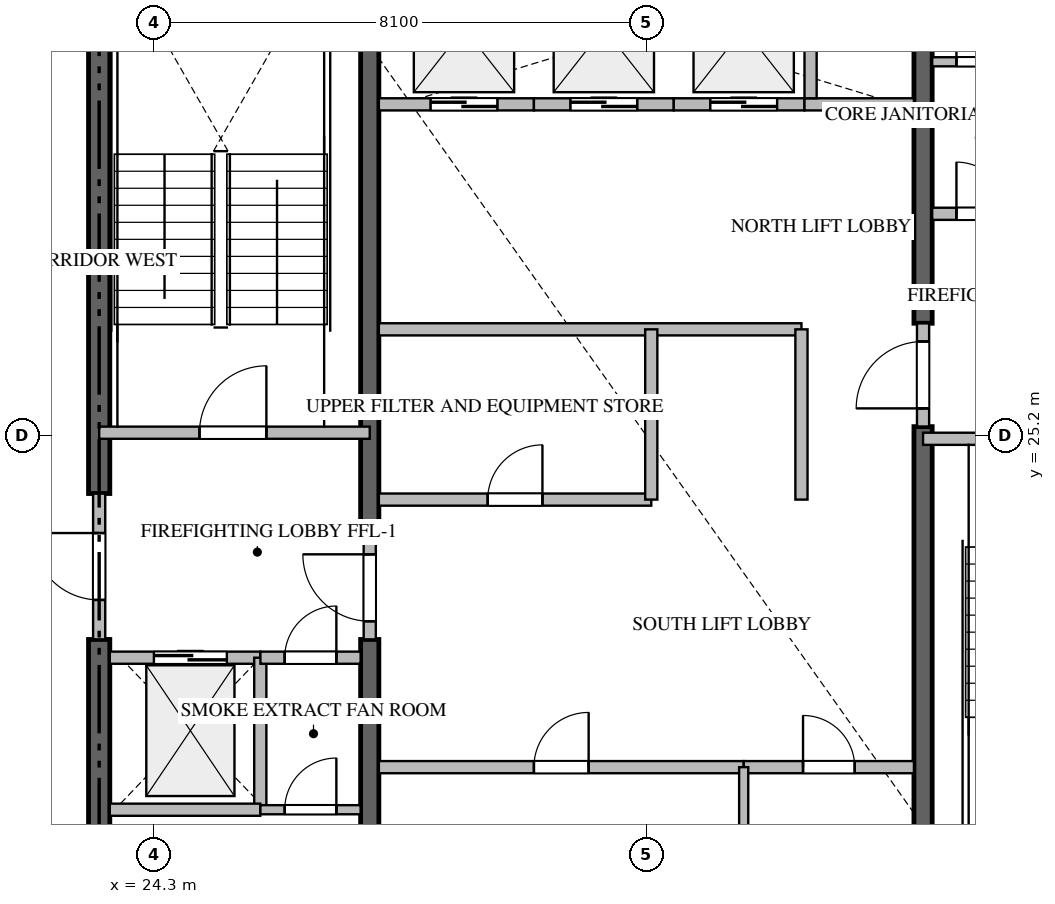
"""IFC4 building model, lengths in metres.
Left out: names, types, materials, properties, quantities, classifications, styles, units other than length and angle.
Written with IfcOpenShell. Run it as: python <this file> out.ifc"""

import sys

from ifc_helpers import new_model, si_unit, direction, frame, frame_2d, origin, place, context, subcontext, project, spatial, rectangle, extrude, source, transform, mapped, element, fill, save


model = new_model("IFC4")
c1 = context("Model", 3, precision=1e-05, world=origin(), true_north=direction((0.0, 1.0)))
c2 = subcontext(c1, "Body", "Model", "MODEL_VIEW")
j1 = project(units=[si_unit("LENGTHUNIT", "METRE"), si_unit("PLANEANGLEUNIT", "RADIAN")], contexts=[c1])
p1 = place(None, origin())
s1 = spatial("IfcSite", under=j1, at=p1, CompositionType="ELEMENT")
p2 = place(p1, origin())
s2 = spatial("IfcBuilding", under=s1, at=p2, CompositionType="ELEMENT")
p3 = place(p2, frame((0.0, 0.0, 272.05)))
s3 = spatial("IfcBuildingStorey", under=s2, at=p3, CompositionType="ELEMENT", Elevation=272.05)
p4 = place(p3, frame((23.4, 16.975, -0.26), z_axis=(0.0, 0.0, 1.0), x_axis=(0.0, 1.0, 0.0)))
e1 = element("IfcWall", 1, at=p4, inside=s3, PredefinedType="SHEAR", context=c2, shape_type="SweptSolid", body=[
    extrude(rectangle(XDim=4.875, YDim=0.35, at=frame_2d((2.438, 0.0))), origin(), (0.0, 0.0, 1.0), 3.848),
])
p5 = place(p3, frame((23.4, 24.25, -0.26), z_axis=(0.0, 0.0, 1.0), x_axis=(0.0, 1.0, 0.0)))
e2 = element("IfcWall", 2, at=p5, inside=s3, PredefinedType="SHEAR", context=c2, shape_type="SweptSolid", body=[
    extrude(rectangle(XDim=9.175, YDim=0.35, at=frame_2d((4.587, 0.0))), origin(), (0.0, 0.0, 1.0), 3.848),
])
p6 = place(p3, frame((27.85, 16.975, -0.26), z_axis=(0.0, 0.0, 1.0), x_axis=(0.0, 1.0, 0.0)))
e3 = element("IfcWall", 3, at=p6, inside=s3, PredefinedType="SHEAR", context=c2, shape_type="SweptSolid", body=[
    extrude(rectangle(XDim=4.875, YDim=0.3, at=frame_2d((2.438, 0.0))), origin(), (0.0, 0.0, 1.0), 3.848),
])
p7 = place(p3, frame((27.85, 23.55, -0.26), z_axis=(0.0, 0.0, 1.0), x_axis=(0.0, 1.0, 0.0)))
e4 = element("IfcWall", 4, at=p7, inside=s3, PredefinedType="SHEAR", context=c2, shape_type="SweptSolid", body=[
    extrude(rectangle(XDim=9.875, YDim=0.3, at=frame_2d((4.938, 0.0))), origin(), (0.0, 0.0, 1.0), 3.848),
])
p8 = place(p3, frame((36.95, 16.975, -0.26), z_axis=(0.0, 0.0, 1.0), x_axis=(0.0, 1.0, 0.0)))
e5 = element("IfcWall", 5, at=p8, inside=s3, PredefinedType="SHEAR", context=c2, shape_type="SweptSolid", body=[
    extrude(rectangle(XDim=8.375, YDim=0.3, at=frame_2d((4.188, 0.0))), origin(), (0.0, 0.0, 1.0), 3.848),
])
p9 = place(p3, frame((36.95, 27.05, -0.26), z_axis=(0.0, 0.0, 1.0), x_axis=(0.0, 1.0, 0.0)))
e6 = element("IfcWall", 6, at=p9, inside=s3, PredefinedType="SHEAR", context=c2, shape_type="SweptSolid", body=[
    extrude(rectangle(XDim=6.375, YDim=0.3, at=frame_2d((3.188, 0.0))), origin(), (0.0, 0.0, 1.0), 3.848),
])
p10 = place(p3, frame((23.4, 25.25, 0.0), z_axis=(0.0, 0.0, 1.0), x_axis=(1.0, 0.0, 0.0)))
e7 = element("IfcWall", 7, at=p10, inside=s3, PredefinedType="STANDARD", context=c2, shape_type="SweptSolid", body=[
    extrude(rectangle(XDim=4.45, YDim=0.2, at=frame_2d((2.225, 0.0))), origin(), (0.0, 0.0, 1.0), 3.59),
])
p11 = place(p10, frame((1.65, 0.0, 0.0)))
e8 = element("IfcOpeningElement", 8, at=p11, cuts=e7, PredefinedType="OPENING", context=c2, shape_type="SweptSolid", body=[
    extrude(rectangle(XDim=1.1, YDim=2.15, at=frame_2d((0.55, 1.075))), frame((0.0, 0.11, 0.0), z_axis=(0.0, -1.0, 0.0), x_axis=(1.0, 0.0, 0.0)), (0.0, 0.0, 1.0), 0.22),
])
p12 = place(p3, frame((36.95, 25.15, 0.0), z_axis=(0.0, 0.0, 1.0), x_axis=(1.0, 0.0, 0.0)))
e9 = element("IfcWall", 9, at=p12, inside=s3, PredefinedType="STANDARD", context=c2, shape_type="SweptSolid", body=[
    extrude(rectangle(XDim=4.45, YDim=0.2, at=frame_2d((2.225, 0.0))), origin(), (0.0, 0.0, 1.0), 3.59),
])
p13 = place(p12, frame((1.65, 0.0, 0.0)))
e10 = element("IfcOpeningElement", 10, at=p13, cuts=e9, PredefinedType="OPENING", context=c2, shape_type="SweptSolid", body=[
    extrude(rectangle(XDim=1.1, YDim=2.15, at=frame_2d((0.55, 1.075))), frame((0.0, 0.11, 0.0), z_axis=(0.0, -1.0, 0.0), x_axis=(1.0, 0.0, 0.0)), (0.0, 0.0, 1.0), 0.22),
])
p14 = place(p3, frame((23.575, 21.55, 0.0), z_axis=(0.0, 0.0, 1.0), x_axis=(1.0, 0.0, 0.0)))
e11 = element("IfcWall", 11, at=p14, inside=s3, PredefinedType="STANDARD", context=c2, shape_type="SweptSolid", body=[
    extrude(rectangle(XDim=2.475, YDim=0.2, at=frame_2d((1.238, 0.0))), origin(), (0.0, 0.0, 1.0), 3.59),
])
p15 = place(p14, frame((0.725, 0.0, 0.0)))
e12 = element("IfcOpeningElement", 12, at=p15, cuts=e11, PredefinedType="OPENING", context=c2, shape_type="SweptSolid", body=[
    extrude(rectangle(XDim=1.2, YDim=2.2, at=frame_2d((0.6, 1.1))), frame((0.0, 0.11, 0.0), z_axis=(0.0, -1.0, 0.0), x_axis=(1.0, 0.0, 0.0)), (0.0, 0.0, 1.0), 0.22),
])
p16 = place(p3, frame((28.0, 30.65, 0.0), z_axis=(0.0, 0.0, 1.0), x_axis=(1.0, 0.0, 0.0)))
e13 = element("IfcWall", 13, at=p16, inside=s3, PredefinedType="STANDARD", context=c2, shape_type="SweptSolid", body=[
    extrude(rectangle(XDim=2.55, YDim=0.2, at=frame_2d((1.275, 0.0))), origin(), (0.0, 0.0, 1.0), 3.59),
])
p17 = place(p16, frame((0.85, 0.0, 0.0)))
e14 = element("IfcOpeningElement", 14, at=p17, cuts=e13, PredefinedType="OPENING", context=c2, shape_type="SweptSolid", body=[
    extrude(rectangle(XDim=1.1, YDim=2.2, at=frame_2d((0.55, 1.1))), frame((0.0, 0.11, 0.0), z_axis=(0.0, -1.0, 0.0), x_axis=(1.0, 0.0, 0.0)), (0.0, 0.0, 1.0), 0.22),
])
p18 = place(p3, frame((30.55, 30.65, 0.0), z_axis=(0.0, 0.0, 1.0), x_axis=(1.0, 0.0, 0.0)))
e15 = element("IfcWall", 15, at=p18, inside=s3, PredefinedType="STANDARD", context=c2, shape_type="SweptSolid", body=[
    extrude(rectangle(XDim=2.3, YDim=0.2, at=frame_2d((1.15, 0.0))), origin(), (0.0, 0.0, 1.0), 3.59),
])
p19 = place(p18, frame((0.6, 0.0, 0.0)))
e16 = element("IfcOpeningElement", 16, at=p19, cuts=e15, PredefinedType="OPENING", context=c2, shape_type="SweptSolid", body=[
    extrude(rectangle(XDim=1.1, YDim=2.2, at=frame_2d((0.55, 1.1))), frame((0.0, 0.11, 0.0), z_axis=(0.0, -1.0, 0.0), x_axis=(1.0, 0.0, 0.0)), (0.0, 0.0, 1.0), 0.22),
])
p20 = place(p3, frame((32.85, 30.65, 0.0), z_axis=(0.0, 0.0, 1.0), x_axis=(1.0, 0.0, 0.0)))
e17 = element("IfcWall", 17, at=p20, inside=s3, PredefinedType="STANDARD", context=c2, shape_type="SweptSolid", body=[
    extrude(rectangle(XDim=2.15, YDim=0.2, at=frame_2d((1.075, 0.0))), origin(), (0.0, 0.0, 1.0), 3.59),
])
p21 = place(p20, frame((0.6, 0.0, 0.0)))
e18 = element("IfcOpeningElement", 18, at=p21, cuts=e17, PredefinedType="OPENING", context=c2, shape_type="SweptSolid", body=[
    extrude(rectangle(XDim=1.1, YDim=2.2, at=frame_2d((0.55, 1.1))), frame((0.0, 0.11, 0.0), z_axis=(0.0, -1.0, 0.0), x_axis=(1.0, 0.0, 0.0)), (0.0, 0.0, 1.0), 0.22),
])
p22 = place(p3, frame((35.0, 30.65, 0.0), z_axis=(0.0, 0.0, 1.0), x_axis=(1.0, 0.0, 0.0)))
e19 = element("IfcWall", 19, at=p22, inside=s3, PredefinedType="STANDARD", context=c2, shape_type="SweptSolid", body=[
    extrude(rectangle(XDim=1.8, YDim=0.2, at=frame_2d((0.9, 0.0))), origin(), (0.0, 0.0, 1.0), 3.59),
])
p23 = place(p3, frame((35.1, 30.75, 0.0), z_axis=(0.0, 0.0, 1.0), x_axis=(0.0, 1.0, 0.0)))
e20 = element("IfcWall", 20, at=p23, inside=s3, PredefinedType="STANDARD", context=c2, shape_type="SweptSolid", body=[
    extrude(rectangle(XDim=2.675, YDim=0.2, at=frame_2d((1.337, 0.0))), origin(), (0.0, 0.0, 1.0), 3.59),
])
p24 = place(p3, frame((26.05, 19.05, 0.0), z_axis=(0.0, 0.0, 1.0), x_axis=(0.0, 1.0, 0.0)))
e21 = element("IfcWall", 21, at=p24, inside=s3, PredefinedType="STANDARD", context=c2, shape_type="SweptSolid", body=[
    extrude(rectangle(XDim=2.5, YDim=0.2, at=frame_2d((1.25, 0.0))), origin(), (0.0, 0.0, 1.0), 3.59),
])
p25 = place(p3, frame((23.575, 19.05, 0.0), z_axis=(0.0, 0.0, 1.0), x_axis=(1.0, 0.0, 0.0)))
e22 = element("IfcWall", 22, at=p25, inside=s3, PredefinedType="STANDARD", context=c2, shape_type="SweptSolid", body=[
    extrude(rectangle(XDim=2.475, YDim=0.2, at=frame_2d((1.238, 0.0))), origin(), (0.0, 0.0, 1.0), 3.59),
])
p26 = place(p3, frame((26.052, 21.55, 0.0), z_axis=(0.0, 0.0, 1.0), x_axis=(1.0, 0.0, 0.0)))
e23 = element("IfcWall", 23, at=p26, inside=s3, PredefinedType="STANDARD", context=c2, shape_type="SweptSolid", body=[
    extrude(rectangle(XDim=1.648, YDim=0.2, at=frame_2d((0.824, 0.0))), origin(), (0.0, 0.0, 1.0), 3.59),
])
p27 = place(p26, frame((0.399, 0.0, 0.0)))
e24 = element("IfcOpeningElement", 24, at=p27, cuts=e23, PredefinedType="OPENING", context=c2, shape_type="SweptSolid", body=[
    extrude(rectangle(XDim=0.85, YDim=2.1, at=frame_2d((0.425, 1.05))), frame((0.0, 0.11, 0.0), z_axis=(0.0, -1.0, 0.0), x_axis=(1.0, 0.0, 0.0)), (0.0, 0.0, 1.0), 0.22),
])
p28 = place(p3, frame((37.1, 28.85, 0.0), z_axis=(0.0, 0.0, 1.0), x_axis=(1.0, 0.0, 0.0)))
e25 = element("IfcWall", 25, at=p28, inside=s3, PredefinedType="STANDARD", context=c2, shape_type="SweptSolid", body=[
    extrude(rectangle(XDim=1.648, YDim=0.2, at=frame_2d((0.824, 0.0))), origin(), (0.0, 0.0, 1.0), 3.59),
])
p29 = place(p28, frame((0.399, 0.0, 0.0)))
e26 = element("IfcOpeningElement", 26, at=p29, cuts=e25, PredefinedType="OPENING", context=c2, shape_type="SweptSolid", body=[
    extrude(rectangle(XDim=0.85, YDim=2.1, at=frame_2d((0.425, 1.05))), frame((0.0, 0.11, 0.0), z_axis=(0.0, -1.0, 0.0), x_axis=(1.0, 0.0, 0.0)), (0.0, 0.0, 1.0), 0.22),
])
p30 = place(p3, frame((23.4, 21.852, 0.0), z_axis=(0.0, 0.0, 1.0), x_axis=(0.0, 1.0, 0.0)))
e27 = element("IfcWall", 27, at=p30, inside=s3, PredefinedType="STANDARD", context=c2, shape_type="SweptSolid", body=[
    extrude(rectangle(XDim=2.396, YDim=0.2, at=frame_2d((1.198, 0.0))), origin(), (0.0, 0.0, 1.0), 3.59),
])
p31 = place(p30, frame((0.648, 0.0, 0.0)))
e28 = element("IfcOpeningElement", 28, at=p31, cuts=e27, PredefinedType="OPENING", context=c2, shape_type="SweptSolid", body=[
    extrude(rectangle(XDim=1.1, YDim=2.15, at=frame_2d((0.55, 1.075))), frame((0.0, 0.11, 0.0), z_axis=(0.0, -1.0, 0.0), x_axis=(1.0, 0.0, 0.0)), (0.0, 0.0, 1.0), 0.22),
])
p32 = place(p3, frame((27.85, 21.852, 0.0), z_axis=(0.0, 0.0, 1.0), x_axis=(0.0, 1.0, 0.0)))
e29 = element("IfcWall", 29, at=p32, inside=s3, PredefinedType="STANDARD", context=c2, shape_type="SweptSolid", body=[
    extrude(rectangle(XDim=1.696, YDim=0.2, at=frame_2d((0.848, 0.0))), origin(), (0.0, 0.0, 1.0), 3.59),
])
p33 = place(p32, frame((0.298, 0.0, 0.0)))
e30 = element("IfcOpeningElement", 30, at=p33, cuts=e29, PredefinedType="OPENING", context=c2, shape_type="SweptSolid", body=[
    extrude(rectangle(XDim=1.1, YDim=2.15, at=frame_2d((0.55, 1.075))), frame((0.0, 0.11, 0.0), z_axis=(0.0, -1.0, 0.0), x_axis=(1.0, 0.0, 0.0)), (0.0, 0.0, 1.0), 0.22),
])
p34 = place(p3, frame((36.95, 25.352, 0.0), z_axis=(0.0, 0.0, 1.0), x_axis=(0.0, 1.0, 0.0)))
e31 = element("IfcWall", 31, at=p34, inside=s3, PredefinedType="STANDARD", context=c2, shape_type="SweptSolid", body=[
    extrude(rectangle(XDim=1.696, YDim=0.2, at=frame_2d((0.848, 0.0))), origin(), (0.0, 0.0, 1.0), 3.59),
])
p35 = place(p34, frame((0.298, 0.0, 0.0)))
e32 = element("IfcOpeningElement", 32, at=p35, cuts=e31, PredefinedType="OPENING", context=c2, shape_type="SweptSolid", body=[
    extrude(rectangle(XDim=1.1, YDim=2.15, at=frame_2d((0.55, 1.075))), frame((0.0, 0.11, 0.0), z_axis=(0.0, -1.0, 0.0), x_axis=(1.0, 0.0, 0.0)), (0.0, 0.0, 1.0), 0.22),
])
p36 = place(p3, frame((26.052, 19.05, 0.0), z_axis=(0.0, 0.0, 1.0), x_axis=(1.0, 0.0, 0.0)))
e33 = element("IfcWall", 33, at=p36, inside=s3, PredefinedType="PARTITIONING", context=c2, shape_type="SweptSolid", body=[
    extrude(rectangle(XDim=1.648, YDim=0.15, at=frame_2d((0.824, 0.0))), origin(), (0.0, 0.0, 1.0), 3.59),
])
p37 = place(p36, frame((0.399, 0.0, 0.0)))
e34 = element("IfcOpeningElement", 34, at=p37, cuts=e33, PredefinedType="OPENING", context=c2, shape_type="SweptSolid", body=[
    extrude(rectangle(XDim=0.85, YDim=2.1, at=frame_2d((0.425, 1.05))), frame((0.0, 0.085, 0.0), z_axis=(0.0, -1.0, 0.0), x_axis=(1.0, 0.0, 0.0)), (0.0, 0.0, 1.0), 0.17),
])
p38 = place(p3, frame((37.1, 31.35, 0.0), z_axis=(0.0, 0.0, 1.0), x_axis=(1.0, 0.0, 0.0)))
e35 = element("IfcWall", 35, at=p38, inside=s3, PredefinedType="PARTITIONING", context=c2, shape_type="SweptSolid", body=[
    extrude(rectangle(XDim=1.648, YDim=0.15, at=frame_2d((0.824, 0.0))), origin(), (0.0, 0.0, 1.0), 3.59),
])
p39 = place(p38, frame((0.399, 0.0, 0.0)))
e36 = element("IfcOpeningElement", 36, at=p39, cuts=e35, PredefinedType="OPENING", context=c2, shape_type="SweptSolid", body=[
    extrude(rectangle(XDim=0.85, YDim=2.1, at=frame_2d((0.425, 1.05))), frame((0.0, 0.085, 0.0), z_axis=(0.0, -1.0, 0.0), x_axis=(1.0, 0.0, 0.0)), (0.0, 0.0, 1.0), 0.17),
])
p40 = place(p3, frame((28.0, 19.75, 0.0), z_axis=(0.0, 0.0, 1.0), x_axis=(1.0, 0.0, 0.0)))
e37 = element("IfcWall", 37, at=p40, inside=s3, PredefinedType="STANDARD", context=c2, shape_type="SweptSolid", body=[
    extrude(rectangle(XDim=6.0, YDim=0.2, at=frame_2d((3.0, 0.0))), origin(), (0.0, 0.0, 1.0), 3.59),
])
p41 = place(p40, frame((2.55, 0.0, 0.0)))
e38 = element("IfcOpeningElement", 38, at=p41, cuts=e37, PredefinedType="OPENING", context=c2, shape_type="SweptSolid", body=[
    extrude(rectangle(XDim=0.9, YDim=2.1, at=frame_2d((0.45, 1.05))), frame((0.0, 0.11, 0.0), z_axis=(0.0, -1.0, 0.0), x_axis=(1.0, 0.0, 0.0)), (0.0, 0.0, 1.0), 0.22),
])
p42 = place(p3, frame((34.002, 19.75, 0.0), z_axis=(0.0, 0.0, 1.0), x_axis=(1.0, 0.0, 0.0)))
e39 = element("IfcWall", 39, at=p42, inside=s3, PredefinedType="STANDARD", context=c2, shape_type="SweptSolid", body=[
    extrude(rectangle(XDim=2.798, YDim=0.2, at=frame_2d((1.399, 0.0))), origin(), (0.0, 0.0, 1.0), 3.59),
])
p43 = place(p42, frame((0.974, 0.0, 0.0)))
e40 = element("IfcOpeningElement", 40, at=p43, cuts=e39, PredefinedType="OPENING", context=c2, shape_type="SweptSolid", body=[
    extrude(rectangle(XDim=0.85, YDim=2.1, at=frame_2d((0.425, 1.05))), frame((0.0, 0.11, 0.0), z_axis=(0.0, -1.0, 0.0), x_axis=(1.0, 0.0, 0.0)), (0.0, 0.0, 1.0), 0.22),
])
p44 = place(p3, frame((34.0, 17.02, 0.0), z_axis=(0.0, 0.0, 1.0), x_axis=(0.0, 1.0, 0.0)))
e41 = element("IfcWall", 41, at=p44, inside=s3, PredefinedType="PARTITIONING", context=c2, shape_type="SweptSolid", body=[
    extrude(rectangle(XDim=2.73, YDim=0.15, at=frame_2d((1.365, 0.0))), origin(), (0.0, 0.0, 1.0), 3.59),
])
p45 = place(p3, frame((28.0, 26.95, 0.0), z_axis=(0.0, 0.0, 1.0), x_axis=(1.0, 0.0, 0.0)))
e42 = element("IfcWall", 42, at=p45, inside=s3, PredefinedType="STANDARD", context=c2, shape_type="SweptSolid", body=[
    extrude(rectangle(XDim=6.95, YDim=0.2, at=frame_2d((3.475, 0.0))), origin(), (0.0, 0.0, 1.0), 3.59),
])
p46 = place(p3, frame((34.95, 24.15, 0.0), z_axis=(0.0, 0.0, 1.0), x_axis=(0.0, 1.0, 0.0)))
e43 = element("IfcWall", 43, at=p46, inside=s3, PredefinedType="STANDARD", context=c2, shape_type="SweptSolid", body=[
    extrude(rectangle(XDim=2.8, YDim=0.2, at=frame_2d((1.4, 0.0))), origin(), (0.0, 0.0, 1.0), 3.59),
])
p47 = place(p3, frame((28.0, 24.15, 0.0), z_axis=(0.0, 0.0, 1.0), x_axis=(1.0, 0.0, 0.0)))
e44 = element("IfcWall", 44, at=p47, inside=s3, PredefinedType="STANDARD", context=c2, shape_type="SweptSolid", body=[
    extrude(rectangle(XDim=4.48, YDim=0.2, at=frame_2d((2.24, 0.0))), origin(), (0.0, 0.0, 1.0), 3.59),
])
p48 = place(p47, frame((1.79, 0.0, 0.0)))
e45 = element("IfcOpeningElement", 45, at=p48, cuts=e44, PredefinedType="OPENING", context=c2, shape_type="SweptSolid", body=[
    extrude(rectangle(XDim=0.9, YDim=2.1, at=frame_2d((0.45, 1.05))), frame((0.0, 0.11, 0.0), z_axis=(0.0, -1.0, 0.0), x_axis=(1.0, 0.0, 0.0)), (0.0, 0.0, 1.0), 0.22),
])
p49 = place(p3, frame((32.48, 24.15, 0.0), z_axis=(0.0, 0.0, 1.0), x_axis=(0.0, 1.0, 0.0)))
e46 = element("IfcWall", 46, at=p49, inside=s3, PredefinedType="STANDARD", context=c2, shape_type="SweptSolid", body=[
    extrude(rectangle(XDim=2.8, YDim=0.2, at=frame_2d((1.4, 0.0))), origin(), (0.0, 0.0, 1.0), 3.59),
])
m1 = source(origin(), c2, "Body", "SweptSolid", [
    extrude(rectangle(XDim=1.1, YDim=2.15, at=frame_2d((0.55, 1.075))), frame((0.0, 0.025, 0.0), z_axis=(0.0, -1.0, 0.0), x_axis=(1.0, 0.0, 0.0)), (0.0, 0.0, 1.0), 0.05),
])
p50 = place(p11, origin())
e47 = element("IfcDoor", 47, at=p50, inside=s3, OperationType="SINGLE_SWING_RIGHT", PredefinedType="DOOR", context=c2, shape_type="MappedRepresentation", body=[
    mapped(m1, transform((0.0, 0.0, 0.0), scale=1.0)),
])
fill(e8, e47)
m2 = source(origin(), c2, "Body", "SweptSolid", [
    extrude(rectangle(XDim=1.2, YDim=2.2, at=frame_2d((0.6, 1.1))), frame((0.0, 0.025, 0.0), z_axis=(0.0, -1.0, 0.0), x_axis=(1.0, 0.0, 0.0)), (0.0, 0.0, 1.0), 0.05),
])
p51 = place(p15, origin())
e48 = element("IfcDoor", 48, at=p51, inside=s3, OperationType="DOUBLE_DOOR_SLIDING", PredefinedType="DOOR", context=c2, shape_type="MappedRepresentation", body=[
    mapped(m2, transform((0.0, 0.0, 0.0), scale=1.0)),
])
fill(e12, e48)
m3 = source(origin(), c2, "Body", "SweptSolid", [
    extrude(rectangle(XDim=1.1, YDim=2.2, at=frame_2d((0.55, 1.1))), frame((0.0, 0.025, 0.0), z_axis=(0.0, -1.0, 0.0), x_axis=(1.0, 0.0, 0.0)), (0.0, 0.0, 1.0), 0.05),
])
p52 = place(p17, origin())
e49 = element("IfcDoor", 49, at=p52, inside=s3, OperationType="DOUBLE_DOOR_SLIDING", PredefinedType="DOOR", context=c2, shape_type="MappedRepresentation", body=[
    mapped(m3, transform((0.0, 0.0, 0.0), scale=1.0)),
])
fill(e14, e49)
p53 = place(p19, origin())
e50 = element("IfcDoor", 50, at=p53, inside=s3, OperationType="DOUBLE_DOOR_SLIDING", PredefinedType="DOOR", context=c2, shape_type="MappedRepresentation", body=[
    mapped(m3, transform((0.0, 0.0, 0.0), scale=1.0)),
])
fill(e16, e50)
p54 = place(p21, origin())
e51 = element("IfcDoor", 51, at=p54, inside=s3, OperationType="DOUBLE_DOOR_SLIDING", PredefinedType="DOOR", context=c2, shape_type="MappedRepresentation", body=[
    mapped(m3, transform((0.0, 0.0, 0.0), scale=1.0)),
])
fill(e18, e51)
m4 = source(origin(), c2, "Body", "SweptSolid", [
    extrude(rectangle(XDim=0.85, YDim=2.1, at=frame_2d((0.425, 1.05))), frame((0.0, 0.025, 0.0), z_axis=(0.0, -1.0, 0.0), x_axis=(1.0, 0.0, 0.0)), (0.0, 0.0, 1.0), 0.05),
])
p55 = place(p27, origin())
e52 = element("IfcDoor", 52, at=p55, inside=s3, OperationType="SINGLE_SWING_RIGHT", PredefinedType="DOOR", context=c2, shape_type="MappedRepresentation", body=[
    mapped(m4, transform((0.0, 0.0, 0.0), scale=1.0)),
])
fill(e24, e52)
p56 = place(p29, origin())
e53 = element("IfcDoor", 53, at=p56, inside=s3, OperationType="SINGLE_SWING_LEFT", PredefinedType="DOOR", context=c2, shape_type="MappedRepresentation", body=[
    mapped(m4, transform((0.0, 0.0, 0.0), scale=1.0)),
])
fill(e26, e53)
p57 = place(p31, origin())
e54 = element("IfcDoor", 54, at=p57, inside=s3, OperationType="SINGLE_SWING_RIGHT", PredefinedType="DOOR", context=c2, shape_type="MappedRepresentation", body=[
    mapped(m1, transform((0.0, 0.0, 0.0), scale=1.0)),
])
fill(e28, e54)
p58 = place(p33, origin())
e55 = element("IfcDoor", 55, at=p58, inside=s3, OperationType="SINGLE_SWING_RIGHT", PredefinedType="DOOR", context=c2, shape_type="MappedRepresentation", body=[
    mapped(m1, transform((0.0, 0.0, 0.0), scale=1.0)),
])
fill(e30, e55)
p59 = place(p35, origin())
e56 = element("IfcDoor", 56, at=p59, inside=s3, OperationType="SINGLE_SWING_LEFT", PredefinedType="DOOR", context=c2, shape_type="MappedRepresentation", body=[
    mapped(m1, transform((0.0, 0.0, 0.0), scale=1.0)),
])
fill(e32, e56)
p60 = place(p37, origin())
e57 = element("IfcDoor", 57, at=p60, inside=s3, OperationType="SINGLE_SWING_RIGHT", PredefinedType="DOOR", context=c2, shape_type="MappedRepresentation", body=[
    mapped(m4, transform((0.0, 0.0, 0.0), scale=1.0)),
])
fill(e34, e57)
p61 = place(p39, origin())
e58 = element("IfcDoor", 58, at=p61, inside=s3, OperationType="SINGLE_SWING_LEFT", PredefinedType="DOOR", context=c2, shape_type="MappedRepresentation", body=[
    mapped(m4, transform((0.0, 0.0, 0.0), scale=1.0)),
])
fill(e36, e58)
m5 = source(origin(), c2, "Body", "SweptSolid", [
    extrude(rectangle(XDim=0.9, YDim=2.1, at=frame_2d((0.45, 1.05))), frame((0.0, 0.025, 0.0), z_axis=(0.0, -1.0, 0.0), x_axis=(1.0, 0.0, 0.0)), (0.0, 0.0, 1.0), 0.05),
])
p62 = place(p41, origin())
e59 = element("IfcDoor", 59, at=p62, inside=s3, OperationType="SINGLE_SWING_RIGHT", PredefinedType="DOOR", context=c2, shape_type="MappedRepresentation", body=[
    mapped(m5, transform((0.0, 0.0, 0.0), scale=1.0)),
])
fill(e38, e59)
p63 = place(p43, origin())
e60 = element("IfcDoor", 60, at=p63, inside=s3, OperationType="SINGLE_SWING_LEFT", PredefinedType="DOOR", context=c2, shape_type="MappedRepresentation", body=[
    mapped(m4, transform((0.0, 0.0, 0.0), scale=1.0)),
])
fill(e40, e60)
p64 = place(p48, origin())
e61 = element("IfcDoor", 61, at=p64, inside=s3, OperationType="SINGLE_SWING_RIGHT", PredefinedType="DOOR", context=c2, shape_type="MappedRepresentation", body=[
    mapped(m5, transform((0.0, 0.0, 0.0), scale=1.0)),
])
fill(e45, e61)
save(model, sys.argv[1])
